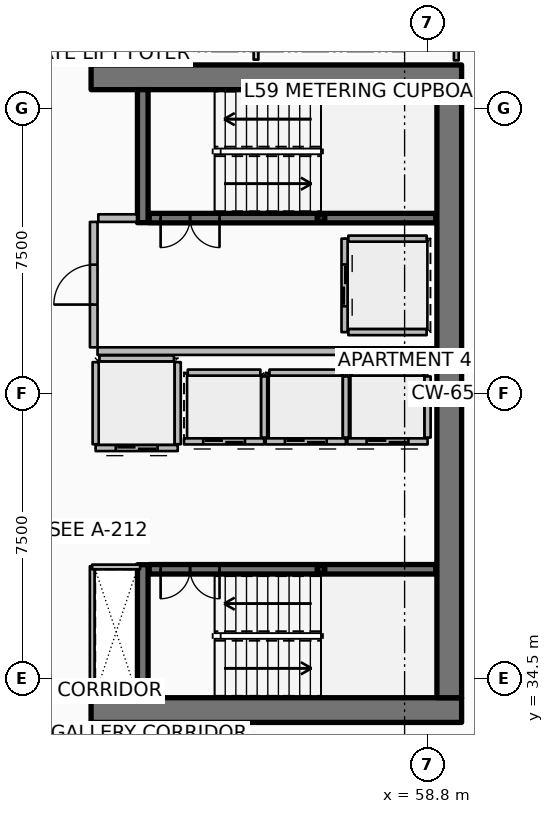
"""IFC4 building model, lengths in metres.
Left out: names, types, materials, properties, quantities, classifications, styles, units other than length and angle.
Written with IfcOpenShell. Run it as: python <this file> out.ifc"""

import sys

from ifc_helpers import new_model, si_unit, direction, frame, frame_2d, origin, origin_2d, place, context, subcontext, project, spatial, rectangle, hollow_rectangle, extrude, element, fill, save


model = new_model("IFC4")
c1 = context("Model", 3, precision=1e-05, world=origin(), true_north=direction((0.0, 1.0)))
c2 = subcontext(c1, "Body", "Model", "MODEL_VIEW")
j1 = project(units=[si_unit("LENGTHUNIT", "METRE"), si_unit("PLANEANGLEUNIT", "RADIAN")], contexts=[c1])
p1 = place(None, origin())
s1 = spatial("IfcSite", under=j1, at=p1, CompositionType="ELEMENT")
p2 = place(p1, origin())
s2 = spatial("IfcBuilding", under=s1, at=p2, CompositionType="ELEMENT")
p3 = place(p2, frame((0.0, 0.0, 236.7)))
s3 = spatial("IfcBuildingStorey", under=s2, at=p3, CompositionType="ELEMENT", Elevation=236.7)
for number, where, z_axis, x_axis in (
    (1, (49.95, 33.675, 0.0), (0.0, 0.0, 1.0), (1.0, 0.0, 0.0)),
    (2, (49.95, 50.325, 0.0), (0.0, 0.0, 1.0), (1.0, 0.0, 0.0)),
):
    element("IfcWall", number, at=place(p3, frame(where, z_axis=z_axis, x_axis=x_axis)), inside=s3, PredefinedType="SHEAR", context=c2, shape_type="SweptSolid", body=[
        extrude(rectangle(XDim=9.75, YDim=0.65, at=frame_2d((4.875, 0.0))), origin(), (0.0, 0.0, 1.0), 3.85),
    ])
p4 = place(p3, frame((59.375, 34.0, 0.0), z_axis=(0.0, 0.0, 1.0), x_axis=(0.0, 1.0, 0.0)))
e3 = element("IfcWall", 3, at=p4, inside=s3, PredefinedType="SHEAR", context=c2, shape_type="SweptSolid", body=[
    extrude(rectangle(XDim=16.0, YDim=0.65, at=frame_2d((8.0, 0.0))), origin(), (0.0, 0.0, 1.0), 3.85),
])
for number, where, z_axis, x_axis in (
    (4, (51.31, 46.5, 0.0), (0.0, 0.0, 1.0), (0.0, 1.0, 0.0)),
    (5, (51.31, 34.0, 0.0), (0.0, 0.0, 1.0), (0.0, 1.0, 0.0)),
):
    element("IfcWall", number, at=place(p3, frame(where, z_axis=z_axis, x_axis=x_axis)), inside=s3, PredefinedType="SHEAR", context=c2, shape_type="SweptSolid", body=[
        extrude(rectangle(XDim=3.5, YDim=0.28, at=frame_2d((1.75, 0.0))), origin(), (0.0, 0.0, 1.0), 3.85),
    ])
for number, where, z_axis, x_axis in (
    (6, (56.0, 46.62, 0.0), (0.0, 0.0, 1.0), (1.0, 0.0, 0.0)),
    (7, (56.0, 37.38, 0.0), (0.0, 0.0, 1.0), (1.0, 0.0, 0.0)),
):
    element("IfcColumn", number, at=place(p3, frame(where, z_axis=z_axis, x_axis=x_axis)), inside=s3, PredefinedType="COLUMN", context=c2, shape_type="SweptSolid", body=[
        extrude(hollow_rectangle(XDim=0.2, YDim=0.2, WallThickness=0.01, InnerFilletRadius=0.01, OuterFilletRadius=0.02, at=origin_2d()), origin(), (0.0, 0.0, 1.0), 1.72),
    ])
p5 = place(p3, frame((51.48, 46.62, 0.0), z_axis=(0.0, 0.0, 1.0), x_axis=(1.0, 0.0, 0.0)))
e8 = element("IfcWall", 8, at=p5, inside=s3, PredefinedType="SOLIDWALL", context=c2, shape_type="SweptSolid", body=[
    extrude(rectangle(XDim=7.54, YDim=0.25, at=frame_2d((3.77, 0.0))), origin(), (0.0, 0.0, 1.0), 3.59),
])
p6 = place(p5, frame((0.3, 0.0, 0.0)))
e9 = element("IfcOpeningElement", 9, at=p6, cuts=e8, PredefinedType="OPENING", context=c2, shape_type="SweptSolid", body=[
    extrude(rectangle(XDim=1.55, YDim=2.15, at=frame_2d((0.775, 1.075))), frame((0.0, 0.135, 0.0), z_axis=(0.0, -1.0, 0.0), x_axis=(1.0, 0.0, 0.0)), (0.0, 0.0, 1.0), 0.27),
])
p7 = place(p3, frame((51.48, 37.38, 0.0), z_axis=(0.0, 0.0, 1.0), x_axis=(1.0, 0.0, 0.0)))
e10 = element("IfcWall", 10, at=p7, inside=s3, PredefinedType="SOLIDWALL", context=c2, shape_type="SweptSolid", body=[
    extrude(rectangle(XDim=7.54, YDim=0.25, at=frame_2d((3.77, 0.0))), origin(), (0.0, 0.0, 1.0), 3.59),
])
p8 = place(p7, frame((0.3, 0.0, 0.0)))
e11 = element("IfcOpeningElement", 11, at=p8, cuts=e10, PredefinedType="OPENING", context=c2, shape_type="SweptSolid", body=[
    extrude(rectangle(XDim=1.55, YDim=2.15, at=frame_2d((0.775, 1.075))), frame((0.0, 0.135, 0.0), z_axis=(0.0, -1.0, 0.0), x_axis=(1.0, 0.0, 0.0)), (0.0, 0.0, 1.0), 0.27),
])
p9 = place(p3, frame((54.505, 40.745, 0.0), z_axis=(0.0, 0.0, 1.0), x_axis=(-1.0, 0.0, 0.0)))
e12 = element("IfcWall", 12, at=p9, inside=s3, PredefinedType="PARTITIONING", context=c2, shape_type="SweptSolid", body=[
    extrude(rectangle(XDim=2.11, YDim=0.16, at=frame_2d((1.055, 0.0))), origin(), (0.0, 0.0, 1.0), 3.59),
])
p10 = place(p9, frame((0.505, 0.0, 0.0)))
e13 = element("IfcOpeningElement", 13, at=p10, cuts=e12, PredefinedType="OPENING", context=c2, shape_type="SweptSolid", body=[
    extrude(rectangle(XDim=1.1, YDim=2.1, at=frame_2d((0.55, 1.05))), frame((0.0, 0.09, 0.0), z_axis=(0.0, -1.0, 0.0), x_axis=(1.0, 0.0, 0.0)), (0.0, 0.0, 1.0), 0.18),
])
p11 = place(p3, frame((54.505, 40.845, 0.0), z_axis=(0.0, 0.0, 1.0), x_axis=(0.0, 1.0, 0.0)))
e14 = element("IfcWall", 14, at=p11, inside=s3, PredefinedType="PARTITIONING", context=c2, shape_type="SweptSolid", body=[
    extrude(rectangle(XDim=1.61, YDim=0.16, at=frame_2d((0.805, 0.0))), origin(), (0.0, 0.0, 1.0), 3.59),
])
p12 = place(p3, frame((52.495, 42.555, 0.0), z_axis=(0.0, 0.0, 1.0), x_axis=(1.0, 0.0, 0.0)))
e15 = element("IfcWall", 15, at=p12, inside=s3, PredefinedType="PARTITIONING", context=c2, shape_type="SweptSolid", body=[
    extrude(rectangle(XDim=1.91, YDim=0.16, at=frame_2d((0.955, 0.0))), origin(), (0.0, 0.0, 1.0), 3.59),
])
p13 = place(p3, frame((56.655, 40.745, 0.0), z_axis=(0.0, 0.0, 1.0), x_axis=(-1.0, 0.0, 0.0)))
e16 = element("IfcWall", 16, at=p13, inside=s3, PredefinedType="PARTITIONING", context=c2, shape_type="SweptSolid", body=[
    extrude(rectangle(XDim=2.11, YDim=0.16, at=frame_2d((1.055, 0.0))), origin(), (0.0, 0.0, 1.0), 3.59),
])
p14 = place(p13, frame((0.505, 0.0, 0.0)))
e17 = element("IfcOpeningElement", 17, at=p14, cuts=e16, PredefinedType="OPENING", context=c2, shape_type="SweptSolid", body=[
    extrude(rectangle(XDim=1.1, YDim=2.1, at=frame_2d((0.55, 1.05))), frame((0.0, 0.09, 0.0), z_axis=(0.0, -1.0, 0.0), x_axis=(1.0, 0.0, 0.0)), (0.0, 0.0, 1.0), 0.18),
])
p15 = place(p3, frame((56.655, 40.845, 0.0), z_axis=(0.0, 0.0, 1.0), x_axis=(0.0, 1.0, 0.0)))
e18 = element("IfcWall", 18, at=p15, inside=s3, PredefinedType="PARTITIONING", context=c2, shape_type="SweptSolid", body=[
    extrude(rectangle(XDim=1.61, YDim=0.16, at=frame_2d((0.805, 0.0))), origin(), (0.0, 0.0, 1.0), 3.59),
])
p16 = place(p3, frame((54.645, 42.555, 0.0), z_axis=(0.0, 0.0, 1.0), x_axis=(1.0, 0.0, 0.0)))
e19 = element("IfcWall", 19, at=p16, inside=s3, PredefinedType="PARTITIONING", context=c2, shape_type="SweptSolid", body=[
    extrude(rectangle(XDim=1.91, YDim=0.16, at=frame_2d((0.955, 0.0))), origin(), (0.0, 0.0, 1.0), 3.59),
])
p17 = place(p3, frame((58.805, 40.745, 0.0), z_axis=(0.0, 0.0, 1.0), x_axis=(-1.0, 0.0, 0.0)))
e20 = element("IfcWall", 20, at=p17, inside=s3, PredefinedType="PARTITIONING", context=c2, shape_type="SweptSolid", body=[
    extrude(rectangle(XDim=2.11, YDim=0.16, at=frame_2d((1.055, 0.0))), origin(), (0.0, 0.0, 1.0), 3.59),
])
p18 = place(p17, frame((0.505, 0.0, 0.0)))
e21 = element("IfcOpeningElement", 21, at=p18, cuts=e20, PredefinedType="OPENING", context=c2, shape_type="SweptSolid", body=[
    extrude(rectangle(XDim=1.1, YDim=2.1, at=frame_2d((0.55, 1.05))), frame((0.0, 0.09, 0.0), z_axis=(0.0, -1.0, 0.0), x_axis=(1.0, 0.0, 0.0)), (0.0, 0.0, 1.0), 0.18),
])
p19 = place(p3, frame((58.805, 40.845, 0.0), z_axis=(0.0, 0.0, 1.0), x_axis=(0.0, 1.0, 0.0)))
e22 = element("IfcWall", 22, at=p19, inside=s3, PredefinedType="PARTITIONING", context=c2, shape_type="SweptSolid", body=[
    extrude(rectangle(XDim=1.61, YDim=0.16, at=frame_2d((0.805, 0.0))), origin(), (0.0, 0.0, 1.0), 3.59),
])
p20 = place(p3, frame((56.795, 42.555, 0.0), z_axis=(0.0, 0.0, 1.0), x_axis=(1.0, 0.0, 0.0)))
e23 = element("IfcWall", 23, at=p20, inside=s3, PredefinedType="PARTITIONING", context=c2, shape_type="SweptSolid", body=[
    extrude(rectangle(XDim=1.91, YDim=0.16, at=frame_2d((0.955, 0.0))), origin(), (0.0, 0.0, 1.0), 3.59),
])
p21 = place(p3, frame((56.62, 46.08, 0.0), z_axis=(0.0, 0.0, 1.0), x_axis=(0.0, -1.0, 0.0)))
e24 = element("IfcWall", 24, at=p21, inside=s3, PredefinedType="PARTITIONING", context=c2, shape_type="SweptSolid", body=[
    extrude(rectangle(XDim=2.46, YDim=0.16, at=frame_2d((1.23, 0.0))), origin(), (0.0, 0.0, 1.0), 3.59),
])
p22 = place(p21, frame((0.68, 0.0, 0.0)))
e25 = element("IfcOpeningElement", 25, at=p22, cuts=e24, PredefinedType="OPENING", context=c2, shape_type="SweptSolid", body=[
    extrude(rectangle(XDim=1.1, YDim=2.1, at=frame_2d((0.55, 1.05))), frame((0.0, 0.09, 0.0), z_axis=(0.0, -1.0, 0.0), x_axis=(1.0, 0.0, 0.0)), (0.0, 0.0, 1.0), 0.18),
])
for number, where, z_axis, x_axis in (
    (26, (56.72, 46.08, 0.0), (0.0, 0.0, 1.0), (1.0, 0.0, 0.0)),
    (27, (56.72, 43.62, 0.0), (0.0, 0.0, 1.0), (1.0, 0.0, 0.0)),
):
    element("IfcWall", number, at=place(p3, frame(where, z_axis=z_axis, x_axis=x_axis)), inside=s3, PredefinedType="PARTITIONING", context=c2, shape_type="SweptSolid", body=[
        extrude(rectangle(XDim=2.06, YDim=0.16, at=frame_2d((1.03, 0.0))), origin(), (0.0, 0.0, 1.0), 3.59),
    ])
p23 = place(p3, frame((52.23, 40.57, 0.0), z_axis=(0.0, 0.0, 1.0), x_axis=(-1.0, 0.0, 0.0)))
e28 = element("IfcWall", 28, at=p23, inside=s3, PredefinedType="PARTITIONING", context=c2, shape_type="SweptSolid", body=[
    extrude(rectangle(XDim=2.16, YDim=0.16, at=frame_2d((1.08, 0.0))), origin(), (0.0, 0.0, 1.0), 3.59),
])
p24 = place(p23, frame((0.53, 0.0, 0.0)))
e29 = element("IfcOpeningElement", 29, at=p24, cuts=e28, PredefinedType="OPENING", context=c2, shape_type="SweptSolid", body=[
    extrude(rectangle(XDim=1.1, YDim=2.1, at=frame_2d((0.55, 1.05))), frame((0.0, 0.09, 0.0), z_axis=(0.0, -1.0, 0.0), x_axis=(1.0, 0.0, 0.0)), (0.0, 0.0, 1.0), 0.18),
])
for number, where, z_axis, x_axis in (
    (30, (52.23, 40.67, 0.0), (0.0, 0.0, 1.0), (0.0, 1.0, 0.0)),
    (31, (50.07, 40.67, 0.0), (0.0, 0.0, 1.0), (0.0, 1.0, 0.0)),
):
    element("IfcWall", number, at=place(p3, frame(where, z_axis=z_axis, x_axis=x_axis)), inside=s3, PredefinedType="PARTITIONING", context=c2, shape_type="SweptSolid", body=[
        extrude(rectangle(XDim=2.16, YDim=0.16, at=frame_2d((1.08, 0.0))), origin(), (0.0, 0.0, 1.0), 3.59),
    ])
p25 = place(p3, frame((50.17, 42.93, 0.0), z_axis=(0.0, 0.0, 1.0), x_axis=(1.0, 0.0, 0.0)))
e32 = element("IfcWall", 32, at=p25, inside=s3, PredefinedType="PARTITIONING", context=c2, shape_type="SweptSolid", body=[
    extrude(rectangle(XDim=1.96, YDim=0.16, at=frame_2d((0.98, 0.0))), origin(), (0.0, 0.0, 1.0), 3.59),
])
p26 = place(p3, frame((50.12, 43.12, 0.0), z_axis=(0.0, 0.0, 1.0), x_axis=(1.0, 0.0, 0.0)))
e33 = element("IfcWall", 33, at=p26, inside=s3, PredefinedType="PARTITIONING", context=c2, shape_type="SweptSolid", body=[
    extrude(rectangle(XDim=8.88, YDim=0.2, at=frame_2d((4.44, 0.0))), origin(), (0.0, 0.0, 1.0), 3.59),
])
p27 = place(p3, frame((50.14, 46.62, 0.0), z_axis=(0.0, 0.0, 1.0), x_axis=(1.0, 0.0, 0.0)))
e34 = element("IfcWall", 34, at=p27, inside=s3, PredefinedType="PARTITIONING", context=c2, shape_type="SweptSolid", body=[
    extrude(rectangle(XDim=1.02, YDim=0.2, at=frame_2d((0.51, 0.0))), origin(), (0.0, 0.0, 1.0), 3.59),
])
p28 = place(p3, frame((50.02, 43.22, 0.0), z_axis=(0.0, 0.0, 1.0), x_axis=(0.0, 1.0, 0.0)))
e35 = element("IfcWall", 35, at=p28, inside=s3, PredefinedType="PARTITIONING", context=c2, shape_type="SweptSolid", body=[
    extrude(rectangle(XDim=3.3, YDim=0.2, at=frame_2d((1.65, 0.0))), origin(), (0.0, 0.0, 1.0), 3.59),
])
p29 = place(p28, frame((1.125, 0.0, 0.0)))
e36 = element("IfcOpeningElement", 36, at=p29, cuts=e35, PredefinedType="OPENING", context=c2, shape_type="SweptSolid", body=[
    extrude(rectangle(XDim=1.05, YDim=2.1, at=frame_2d((0.525, 1.05))), frame((0.0, 0.11, 0.0), z_axis=(0.0, -1.0, 0.0), x_axis=(1.0, 0.0, 0.0)), (0.0, 0.0, 1.0), 0.22),
])
p30 = place(p3, frame((49.98, 34.06, 0.0), z_axis=(0.0, 0.0, 1.0), x_axis=(0.0, 1.0, 0.0)))
e37 = element("IfcWall", 37, at=p30, inside=s3, PredefinedType="PARTITIONING", context=c2, shape_type="SweptSolid", body=[
    extrude(rectangle(XDim=3.4, YDim=0.125, at=frame_2d((1.7, 0.0))), origin(), (0.0, 0.0, 1.0), 3.03),
])
p31 = place(p3, frame((49.98, 37.44, 0.0), z_axis=(0.0, 0.0, 1.0), x_axis=(1.0, 0.0, 0.0)))
e38 = element("IfcWall", 38, at=p31, inside=s3, PredefinedType="PARTITIONING", context=c2, shape_type="SweptSolid", body=[
    extrude(rectangle(XDim=1.26, YDim=0.125, at=frame_2d((0.63, 0.0))), origin(), (0.0, 0.0, 1.0), 3.03),
])
p32 = place(p3, frame((59.56, 50.77, 0.0), z_axis=(0.0, 0.0, 1.0), x_axis=(0.0, 1.0, 0.0)))
e39 = element("IfcWall", 39, at=p32, inside=s3, PredefinedType="PARTITIONING", context=c2, shape_type="SweptSolid", body=[
    extrude(rectangle(XDim=1.54, YDim=0.125, at=frame_2d((0.77, 0.0))), origin(), (0.0, 0.0, 1.0), 3.03),
])
p33 = place(p3, frame((54.29, 50.79, 0.0), z_axis=(0.0, 0.0, 1.0), x_axis=(0.0, 1.0, 0.0)))
e40 = element("IfcWall", 40, at=p33, inside=s3, PredefinedType="PARTITIONING", context=c2, shape_type="SweptSolid", body=[
    extrude(rectangle(XDim=1.52, YDim=0.125, at=frame_2d((0.76, 0.0))), origin(), (0.0, 0.0, 1.0), 3.03),
])
p34 = place(p33, frame((0.335, 0.0, 0.0)))
e41 = element("IfcOpeningElement", 41, at=p34, cuts=e40, PredefinedType="OPENING", context=c2, shape_type="SweptSolid", body=[
    extrude(rectangle(XDim=0.85, YDim=2.06, at=frame_2d((0.425, 1.03))), frame((0.0, 0.073, 0.0), z_axis=(0.0, -1.0, 0.0), x_axis=(1.0, 0.0, 0.0)), (0.0, 0.0, 1.0), 0.145),
])
p35 = place(p6, origin())
e42 = element("IfcDoor", 42, at=p35, inside=s3, OperationType="DOUBLE_DOOR_SINGLE_SWING", PredefinedType="DOOR", context=c2, shape_type="SweptSolid", body=[
    extrude(rectangle(XDim=1.55, YDim=2.15, at=frame_2d((0.775, 1.075))), frame((0.0, 0.025, 0.0), z_axis=(0.0, -1.0, 0.0), x_axis=(1.0, 0.0, 0.0)), (0.0, 0.0, 1.0), 0.05),
])
fill(e9, e42)
p36 = place(p8, origin())
e43 = element("IfcDoor", 43, at=p36, inside=s3, OperationType="DOUBLE_DOOR_SINGLE_SWING", PredefinedType="DOOR", context=c2, shape_type="SweptSolid", body=[
    extrude(rectangle(XDim=1.55, YDim=2.15, at=frame_2d((0.775, 1.075))), frame((0.0, 0.025, 0.0), z_axis=(0.0, -1.0, 0.0), x_axis=(1.0, 0.0, 0.0)), (0.0, 0.0, 1.0), 0.05),
])
fill(e11, e43)
p37 = place(p10, origin())
e44 = element("IfcDoor", 44, at=p37, inside=s3, OperationType="DOUBLE_DOOR_SLIDING", PredefinedType="DOOR", context=c2, shape_type="SweptSolid", body=[
    extrude(rectangle(XDim=1.1, YDim=2.1, at=frame_2d((0.55, 1.05))), frame((0.0, 0.025, 0.0), z_axis=(0.0, -1.0, 0.0), x_axis=(1.0, 0.0, 0.0)), (0.0, 0.0, 1.0), 0.05),
])
fill(e13, e44)
p38 = place(p14, origin())
e45 = element("IfcDoor", 45, at=p38, inside=s3, OperationType="DOUBLE_DOOR_SLIDING", PredefinedType="DOOR", context=c2, shape_type="SweptSolid", body=[
    extrude(rectangle(XDim=1.1, YDim=2.1, at=frame_2d((0.55, 1.05))), frame((0.0, 0.025, 0.0), z_axis=(0.0, -1.0, 0.0), x_axis=(1.0, 0.0, 0.0)), (0.0, 0.0, 1.0), 0.05),
])
fill(e17, e45)
p39 = place(p18, origin())
e46 = element("IfcDoor", 46, at=p39, inside=s3, OperationType="DOUBLE_DOOR_SLIDING", PredefinedType="DOOR", context=c2, shape_type="SweptSolid", body=[
    extrude(rectangle(XDim=1.1, YDim=2.1, at=frame_2d((0.55, 1.05))), frame((0.0, 0.025, 0.0), z_axis=(0.0, -1.0, 0.0), x_axis=(1.0, 0.0, 0.0)), (0.0, 0.0, 1.0), 0.05),
])
fill(e21, e46)
p40 = place(p22, origin())
e47 = element("IfcDoor", 47, at=p40, inside=s3, OperationType="DOUBLE_DOOR_SLIDING", PredefinedType="DOOR", context=c2, shape_type="SweptSolid", body=[
    extrude(rectangle(XDim=1.1, YDim=2.1, at=frame_2d((0.55, 1.05))), frame((0.0, 0.025, 0.0), z_axis=(0.0, -1.0, 0.0), x_axis=(1.0, 0.0, 0.0)), (0.0, 0.0, 1.0), 0.05),
])
fill(e25, e47)
p41 = place(p24, origin())
e48 = element("IfcDoor", 48, at=p41, inside=s3, OperationType="DOUBLE_DOOR_SLIDING", PredefinedType="DOOR", context=c2, shape_type="SweptSolid", body=[
    extrude(rectangle(XDim=1.1, YDim=2.1, at=frame_2d((0.55, 1.05))), frame((0.0, 0.025, 0.0), z_axis=(0.0, -1.0, 0.0), x_axis=(1.0, 0.0, 0.0)), (0.0, 0.0, 1.0), 0.05),
])
fill(e29, e48)
p42 = place(p29, origin())
e49 = element("IfcDoor", 49, at=p42, inside=s3, OperationType="SINGLE_SWING_LEFT", PredefinedType="DOOR", context=c2, shape_type="SweptSolid", body=[
    extrude(rectangle(XDim=1.05, YDim=2.1, at=frame_2d((0.525, 1.05))), frame((0.0, 0.025, 0.0), z_axis=(0.0, -1.0, 0.0), x_axis=(1.0, 0.0, 0.0)), (0.0, 0.0, 1.0), 0.05),
])
fill(e36, e49)
save(model, sys.argv[1])
